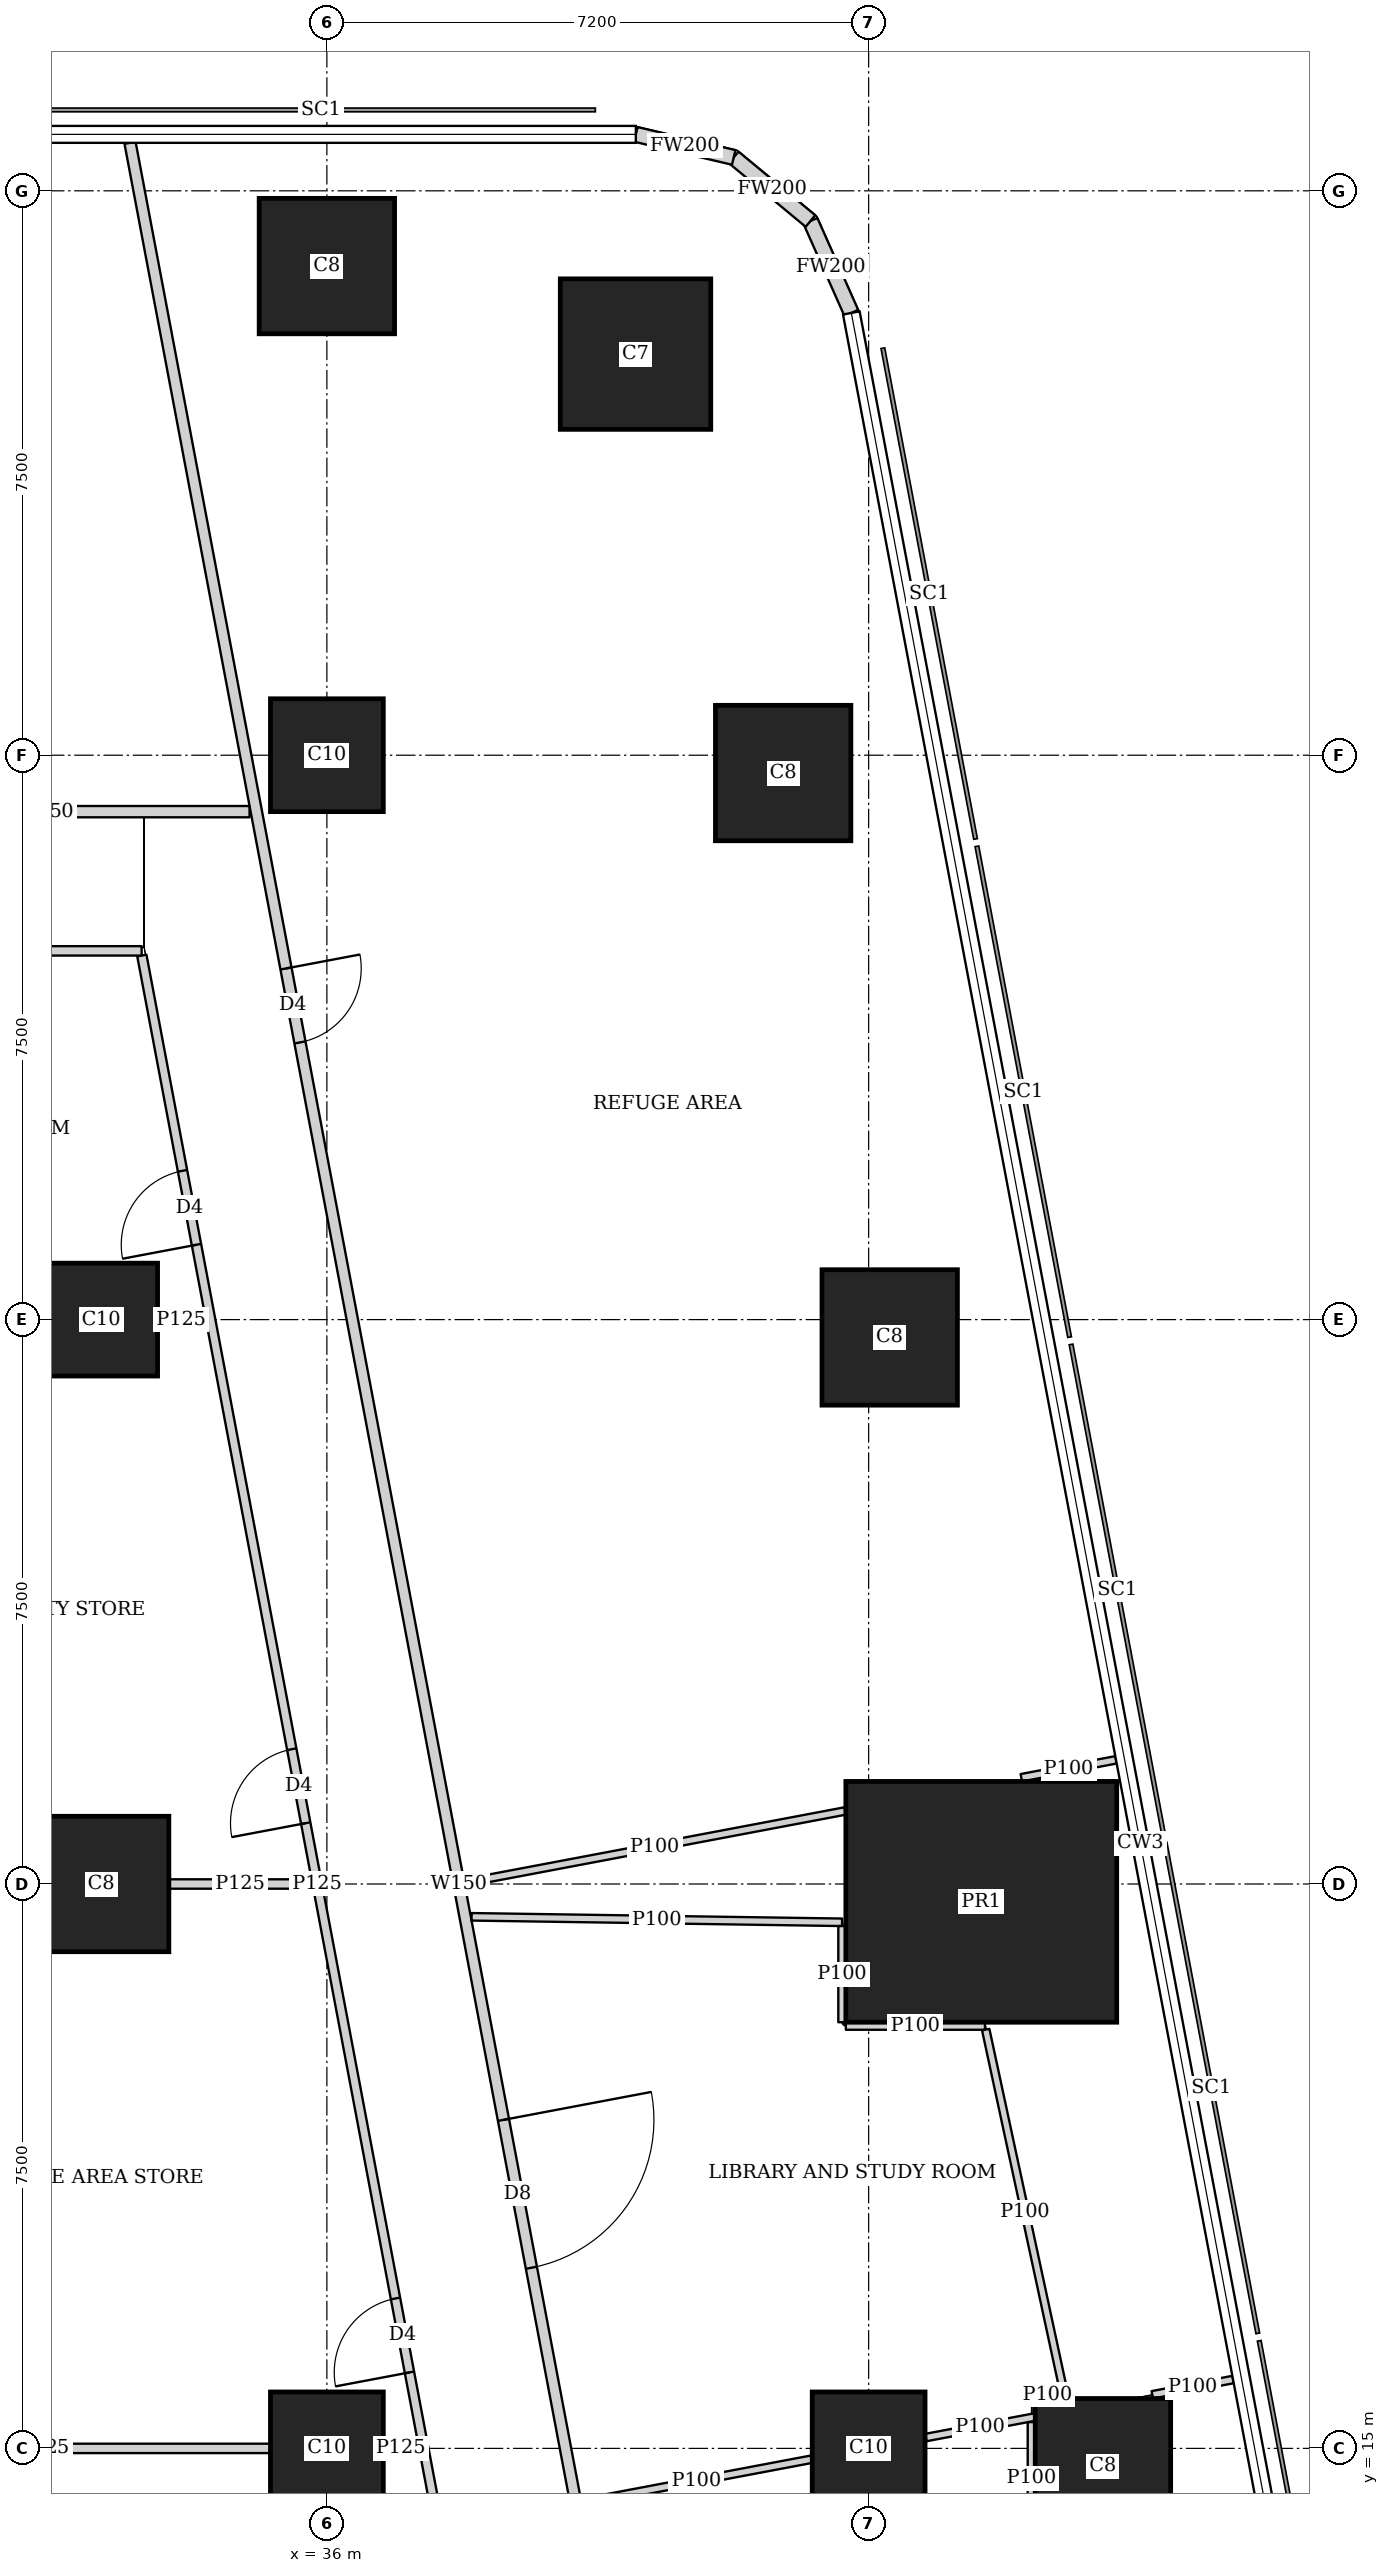
"""IFC4 building model, lengths in metres.
Left out: names, types, materials, properties, quantities, classifications, styles, units other than length and angle.
Written with IfcOpenShell. Run it as: python <this file> out.ifc"""

import sys

from ifc_helpers import new_model, si_unit, direction, frame, frame_2d, origin, origin_2d, place, context, subcontext, project, spatial, rectangle, extrude, element, fill, save


model = new_model("IFC4")
c1 = context("Model", 3, precision=1e-05, world=origin(), true_north=direction((0.0, 1.0)))
c2 = subcontext(c1, "Body", "Model", "MODEL_VIEW")
j1 = project(units=[si_unit("LENGTHUNIT", "METRE"), si_unit("PLANEANGLEUNIT", "RADIAN")], contexts=[c1])
p1 = place(None, origin())
s1 = spatial("IfcSite", under=j1, at=p1, CompositionType="ELEMENT")
p2 = place(p1, origin())
s2 = spatial("IfcBuilding", under=s1, at=p2, CompositionType="ELEMENT")
p3 = place(p2, frame((0.0, 0.0, 188.3)))
s3 = spatial("IfcBuildingStorey", under=s2, at=p3, CompositionType="ELEMENT", Elevation=188.3)
for number, where, z_axis, x_axis in (
    (1, (36.0, 15.0, 0.0), (0.0, 0.0, 1.0), (1.0, 0.0, 0.0)),
    (2, (43.2, 15.0, 0.0), (0.0, 0.0, 1.0), (1.0, 0.0, 0.0)),
):
    element("IfcColumn", number, at=place(p3, frame(where, z_axis=z_axis, x_axis=x_axis)), inside=s3, PredefinedType="COLUMN", context=c2, shape_type="SweptSolid", body=[
        extrude(rectangle(XDim=1.5, YDim=1.5, at=origin_2d()), origin(), (0.0, 0.0, 1.0), 5.4),
    ])
for number, where, z_axis, x_axis in (
    (3, (46.314, 14.763, 0.0), (0.0, 0.0, 1.0), (1.0, 0.0, 0.0)),
    (4, (33.0, 22.5, 0.0), (0.0, 0.0, 1.0), (1.0, 0.0, 0.0)),
):
    element("IfcColumn", number, at=place(p3, frame(where, z_axis=z_axis, x_axis=x_axis)), inside=s3, PredefinedType="COLUMN", context=c2, shape_type="SweptSolid", body=[
        extrude(rectangle(XDim=1.8, YDim=1.8, at=origin_2d()), origin(), (0.0, 0.0, 1.0), 5.4),
    ])
p4 = place(p3, frame((44.697, 22.263, 0.0), z_axis=(0.0, 0.0, 1.0), x_axis=(1.0, 0.0, 0.0)))
e5 = element("IfcColumn", 5, at=p4, inside=s3, PredefinedType="COLUMN", context=c2, shape_type="SweptSolid", body=[
    extrude(rectangle(XDim=3.6, YDim=3.2, at=origin_2d()), origin(), (0.0, 0.0, 1.0), 5.4),
])
p5 = place(p3, frame((33.0, 30.0, 0.0), z_axis=(0.0, 0.0, 1.0), x_axis=(1.0, 0.0, 0.0)))
e6 = element("IfcColumn", 6, at=p5, inside=s3, PredefinedType="COLUMN", context=c2, shape_type="SweptSolid", body=[
    extrude(rectangle(XDim=1.5, YDim=1.5, at=origin_2d()), origin(), (0.0, 0.0, 1.0), 5.4),
])
p6 = place(p3, frame((43.48, 29.763, 0.0), z_axis=(0.0, 0.0, 1.0), x_axis=(1.0, 0.0, 0.0)))
e7 = element("IfcColumn", 7, at=p6, inside=s3, PredefinedType="COLUMN", context=c2, shape_type="SweptSolid", body=[
    extrude(rectangle(XDim=1.8, YDim=1.8, at=origin_2d()), origin(), (0.0, 0.0, 1.0), 5.4),
])
p7 = place(p3, frame((36.0, 37.5, 0.0), z_axis=(0.0, 0.0, 1.0), x_axis=(1.0, 0.0, 0.0)))
e8 = element("IfcColumn", 8, at=p7, inside=s3, PredefinedType="COLUMN", context=c2, shape_type="SweptSolid", body=[
    extrude(rectangle(XDim=1.5, YDim=1.5, at=origin_2d()), origin(), (0.0, 0.0, 1.0), 5.4),
])
p8 = place(p3, frame((42.064, 37.263, 0.0), z_axis=(0.0, 0.0, 1.0), x_axis=(1.0, 0.0, 0.0)))
e9 = element("IfcColumn", 9, at=p8, inside=s3, PredefinedType="COLUMN", context=c2, shape_type="SweptSolid", body=[
    extrude(rectangle(XDim=1.8, YDim=1.8, at=origin_2d()), origin(), (0.0, 0.0, 1.0), 5.4),
])
p9 = place(p3, frame((40.102, 42.83, 0.0), z_axis=(0.0, 0.0, 1.0), x_axis=(1.0, 0.0, 0.0)))
e10 = element("IfcColumn", 10, at=p9, inside=s3, PredefinedType="COLUMN", context=c2, shape_type="SweptSolid", body=[
    extrude(rectangle(XDim=2.0, YDim=2.0, at=origin_2d()), origin(), (0.0, 0.0, 1.0), 5.4),
])
p10 = place(p3, frame((36.0, 44.0, 0.0), z_axis=(0.0, 0.0, 1.0), x_axis=(1.0, 0.0, 0.0)))
e11 = element("IfcColumn", 11, at=p10, inside=s3, PredefinedType="COLUMN", context=c2, shape_type="SweptSolid", body=[
    extrude(rectangle(XDim=1.8, YDim=1.8, at=origin_2d()), origin(), (0.0, 0.0, 1.0), 5.4),
])
p11 = place(p3, frame((42.97, 43.377, 0.0), z_axis=(0.0, 0.0, 1.0), x_axis=(-0.406002956633, 0.913871762998, 0.0)))
e12 = element("IfcWall", 12, at=p11, inside=s3, PredefinedType="SOLIDWALL", context=c2, shape_type="SweptSolid", body=[
    extrude(rectangle(XDim=1.337, YDim=0.2, at=frame_2d((0.669, 0.0))), origin(), (0.0, 0.0, 1.0), 5.15),
])
p12 = place(p3, frame((42.427, 44.599, 0.0), z_axis=(0.0, 0.0, 1.0), x_axis=(-0.770091412544, 0.637933551655, 0.0)))
e13 = element("IfcWall", 13, at=p12, inside=s3, PredefinedType="SOLIDWALL", context=c2, shape_type="SweptSolid", body=[
    extrude(rectangle(XDim=1.324, YDim=0.2, at=frame_2d((0.662, 0.0))), origin(), (0.0, 0.0, 1.0), 5.15),
])
p13 = place(p3, frame((41.407, 45.444, 0.0), z_axis=(0.0, 0.0, 1.0), x_axis=(-0.973453091607, 0.228886606077, 0.0)))
e14 = element("IfcWall", 14, at=p13, inside=s3, PredefinedType="SOLIDWALL", context=c2, shape_type="SweptSolid", body=[
    extrude(rectangle(XDim=1.336, YDim=0.2, at=frame_2d((0.668, 0.0))), origin(), (0.0, 0.0, 1.0), 5.15),
])
p14 = place(p3, frame((29.551, 36.75, 0.0), z_axis=(0.0, 0.0, 1.0), x_axis=(1.0, 0.0, 0.0)))
e15 = element("IfcWall", 15, at=p14, inside=s3, PredefinedType="SOLIDWALL", context=c2, shape_type="SweptSolid", body=[
    extrude(rectangle(XDim=5.421, YDim=0.15, at=frame_2d((2.71, 0.0))), origin(), (0.0, 0.0, 1.0), 3.15),
])
p15 = place(p3, frame((33.384, 45.638, 0.0), z_axis=(0.0, 0.0, 1.0), x_axis=(0.185609889355, -0.982623513342, 0.0)))
e16 = element("IfcWall", 16, at=p15, inside=s3, PredefinedType="SOLIDWALL", context=c2, shape_type="SweptSolid", body=[
    extrude(rectangle(XDim=47.093, YDim=0.15, at=frame_2d((23.547, 0.0))), origin(), (0.0, 0.0, 1.0), 3.35),
])
p16 = place(p15, frame((11.166, 0.0, 0.0)))
e17 = element("IfcOpeningElement", 17, at=p16, cuts=e16, PredefinedType="OPENING", context=c2, shape_type="SweptSolid", body=[
    extrude(rectangle(XDim=1.0, YDim=2.1, at=frame_2d((0.5, 1.05))), frame((0.0, 0.085, 0.0), z_axis=(0.0, -1.0, 0.0), x_axis=(1.0, 0.0, 0.0)), (0.0, 0.0, 1.0), 0.17),
])
p17 = place(p15, frame((26.737, 0.0, 0.0)))
e18 = element("IfcOpeningElement", 18, at=p17, cuts=e16, PredefinedType="OPENING", context=c2, shape_type="SweptSolid", body=[
    extrude(rectangle(XDim=2.0, YDim=2.1, at=frame_2d((1.0, 1.05))), frame((0.0, 0.085, 0.0), z_axis=(0.0, -1.0, 0.0), x_axis=(1.0, 0.0, 0.0)), (0.0, 0.0, 1.0), 0.17),
])
p18 = place(p15, frame((34.058, 0.0, 0.0)))
e19 = element("IfcOpeningElement", 19, at=p18, cuts=e16, PredefinedType="OPENING", context=c2, shape_type="SweptSolid", body=[
    extrude(rectangle(XDim=2.0, YDim=2.1, at=frame_2d((1.0, 1.05))), frame((0.0, 0.085, 0.0), z_axis=(0.0, -1.0, 0.0), x_axis=(1.0, 0.0, 0.0)), (0.0, 0.0, 1.0), 0.17),
])
p19 = place(p3, frame((46.487, 24.15, 0.0), z_axis=(0.0, 0.0, 1.0), x_axis=(-0.982601295661, -0.185727471759, 0.0)))
e20 = element("IfcWall", 20, at=p19, inside=s3, PredefinedType="PARTITIONING", context=c2, shape_type="SweptSolid", body=[
    extrude(rectangle(XDim=1.28, YDim=0.1, at=frame_2d((0.64, 0.0))), origin(), (0.0, 0.0, 1.0), 3.35),
])
p20 = place(p3, frame((42.887, 23.47, 0.0), z_axis=(0.0, 0.0, 1.0), x_axis=(-0.982608146753, -0.185691222019, 0.0)))
e21 = element("IfcWall", 21, at=p20, inside=s3, PredefinedType="PARTITIONING", context=c2, shape_type="SweptSolid", body=[
    extrude(rectangle(XDim=5.149, YDim=0.1, at=frame_2d((2.574, 0.0))), origin(), (0.0, 0.0, 1.0), 3.55),
])
p21 = place(p3, frame((48.043, 15.915, 0.0), z_axis=(0.0, 0.0, 1.0), x_axis=(-0.982549270777, -0.186002501317, 0.0)))
e22 = element("IfcWall", 22, at=p21, inside=s3, PredefinedType="PARTITIONING", context=c2, shape_type="SweptSolid", body=[
    extrude(rectangle(XDim=1.092, YDim=0.1, at=frame_2d((0.546, 0.0))), origin(), (0.0, 0.0, 1.0), 3.35),
])
p22 = place(p3, frame((45.404, 15.416, 0.0), z_axis=(0.0, 0.0, 1.0), x_axis=(-0.982723281097, -0.185080935781, 0.0)))
e23 = element("IfcWall", 23, at=p22, inside=s3, PredefinedType="PARTITIONING", context=c2, shape_type="SweptSolid", body=[
    extrude(rectangle(XDim=1.469, YDim=0.1, at=frame_2d((0.735, 0.0))), origin(), (0.0, 0.0, 1.0), 3.15),
])
p23 = place(p3, frame((42.44, 14.856, 0.0), z_axis=(0.0, 0.0, 1.0), x_axis=(-0.982643027883, -0.185506549084, 0.0)))
e24 = element("IfcWall", 24, at=p23, inside=s3, PredefinedType="PARTITIONING", context=c2, shape_type="SweptSolid", body=[
    extrude(rectangle(XDim=3.11, YDim=0.1, at=frame_2d((1.555, 0.0))), origin(), (0.0, 0.0, 1.0), 3.15),
])
p24 = place(p3, frame((28.95, 34.9, 0.0), z_axis=(0.0, 0.0, 1.0), x_axis=(1.0, 0.0, 0.0)))
e25 = element("IfcWall", 25, at=p24, inside=s3, PredefinedType="PARTITIONING", context=c2, shape_type="SweptSolid", body=[
    extrude(rectangle(XDim=4.588, YDim=0.125, at=frame_2d((2.294, 0.0))), origin(), (0.0, 0.0, 1.0), 3.15),
])
p25 = place(p3, frame((38.202, 10.163, 0.0), z_axis=(0.0, 0.0, 1.0), x_axis=(-0.185610321132, 0.982623431783, 0.0)))
e26 = element("IfcWall", 26, at=p25, inside=s3, PredefinedType="PARTITIONING", context=c2, shape_type="SweptSolid", body=[
    extrude(rectangle(XDim=25.111, YDim=0.125, at=frame_2d((12.556, 0.0))), origin(), (0.0, 0.0, 1.0), 3.55),
])
p26 = place(p25, frame((0.708, 0.0, 0.0)))
e27 = element("IfcOpeningElement", 27, at=p26, cuts=e26, PredefinedType="OPENING", context=c2, shape_type="SweptSolid", body=[
    extrude(rectangle(XDim=1.0, YDim=2.1, at=frame_2d((0.5, 1.05))), frame((0.0, 0.073, 0.0), z_axis=(0.0, -1.0, 0.0), x_axis=(1.0, 0.0, 0.0)), (0.0, 0.0, 1.0), 0.145),
])
p27 = place(p25, frame((5.95, 0.0, 0.0)))
e28 = element("IfcOpeningElement", 28, at=p27, cuts=e26, PredefinedType="OPENING", context=c2, shape_type="SweptSolid", body=[
    extrude(rectangle(XDim=1.0, YDim=2.1, at=frame_2d((0.5, 1.05))), frame((0.0, 0.073, 0.0), z_axis=(0.0, -1.0, 0.0), x_axis=(1.0, 0.0, 0.0)), (0.0, 0.0, 1.0), 0.145),
])
p28 = place(p25, frame((13.378, 0.0, 0.0)))
e29 = element("IfcOpeningElement", 29, at=p28, cuts=e26, PredefinedType="OPENING", context=c2, shape_type="SweptSolid", body=[
    extrude(rectangle(XDim=1.0, YDim=2.1, at=frame_2d((0.5, 1.05))), frame((0.0, 0.073, 0.0), z_axis=(0.0, -1.0, 0.0), x_axis=(1.0, 0.0, 0.0)), (0.0, 0.0, 1.0), 0.145),
])
p29 = place(p25, frame((21.2, 0.0, 0.0)))
e30 = element("IfcOpeningElement", 30, at=p29, cuts=e26, PredefinedType="OPENING", context=c2, shape_type="SweptSolid", body=[
    extrude(rectangle(XDim=1.0, YDim=2.1, at=frame_2d((0.5, 1.05))), frame((0.0, 0.073, 0.0), z_axis=(0.0, -1.0, 0.0), x_axis=(1.0, 0.0, 0.0)), (0.0, 0.0, 1.0), 0.145),
])
p30 = place(p3, frame((29.25, 15.0, 0.0), z_axis=(0.0, 0.0, 1.0), x_axis=(1.0, 0.0, 0.0)))
e31 = element("IfcWall", 31, at=p30, inside=s3, PredefinedType="PARTITIONING", context=c2, shape_type="SweptSolid", body=[
    extrude(rectangle(XDim=5.999, YDim=0.125, at=frame_2d((3.0, 0.0))), origin(), (0.0, 0.0, 1.0), 3.55),
])
p31 = place(p3, frame((36.751, 15.0, 0.0), z_axis=(0.0, 0.0, 1.0), x_axis=(1.0, 0.0, 0.0)))
e32 = element("IfcWall", 32, at=p31, inside=s3, PredefinedType="PARTITIONING", context=c2, shape_type="SweptSolid", body=[
    extrude(rectangle(XDim=0.462, YDim=0.125, at=frame_2d((0.231, 0.0))), origin(), (0.0, 0.0, 1.0), 3.55),
])
p32 = place(p3, frame((33.901, 22.5, 0.0), z_axis=(0.0, 0.0, 1.0), x_axis=(1.0, 0.0, 0.0)))
e33 = element("IfcWall", 33, at=p32, inside=s3, PredefinedType="PARTITIONING", context=c2, shape_type="SweptSolid", body=[
    extrude(rectangle(XDim=1.895, YDim=0.125, at=frame_2d((0.948, 0.0))), origin(), (0.0, 0.0, 1.0), 3.55),
])
p33 = place(p3, frame((33.751, 30.0, 0.0), z_axis=(0.0, 0.0, 1.0), x_axis=(1.0, 0.0, 0.0)))
e34 = element("IfcWall", 34, at=p33, inside=s3, PredefinedType="PARTITIONING", context=c2, shape_type="SweptSolid", body=[
    extrude(rectangle(XDim=0.628, YDim=0.125, at=frame_2d((0.314, 0.0))), origin(), (0.0, 0.0, 1.0), 3.55),
])
p34 = place(p3, frame((37.923, 22.064, 0.0), z_axis=(0.0, 0.0, 1.0), x_axis=(0.99989012089, -0.014823837076, 0.0)))
e35 = element("IfcWall", 35, at=p34, inside=s3, PredefinedType="PARTITIONING", context=c2, shape_type="SweptSolid", body=[
    extrude(rectangle(XDim=4.924, YDim=0.1, at=frame_2d((2.462, 0.0))), origin(), (0.0, 0.0, 1.0), 3.55),
])
p35 = place(p3, frame((42.847, 21.941, 0.0), z_axis=(0.0, 0.0, 1.0), x_axis=(0.0, -1.0, 0.0)))
e36 = element("IfcWall", 36, at=p35, inside=s3, PredefinedType="PARTITIONING", context=c2, shape_type="SweptSolid", body=[
    extrude(rectangle(XDim=1.278, YDim=0.1, at=frame_2d((0.639, 0.0))), origin(), (0.0, 0.0, 1.0), 3.55),
])
p36 = place(p3, frame((42.897, 20.613, 0.0), z_axis=(0.0, 0.0, 1.0), x_axis=(1.0, 0.0, 0.0)))
e37 = element("IfcWall", 37, at=p36, inside=s3, PredefinedType="PARTITIONING", context=c2, shape_type="SweptSolid", body=[
    extrude(rectangle(XDim=1.849, YDim=0.1, at=frame_2d((0.925, 0.0))), origin(), (0.0, 0.0, 1.0), 3.35),
])
p37 = place(p3, frame((44.756, 20.565, 0.0), z_axis=(0.0, 0.0, 1.0), x_axis=(0.210718064905, -0.9775468772, 0.0)))
e38 = element("IfcWall", 38, at=p37, inside=s3, PredefinedType="PARTITIONING", context=c2, shape_type="SweptSolid", body=[
    extrude(rectangle(XDim=4.963, YDim=0.1, at=frame_2d((2.482, 0.0))), origin(), (0.0, 0.0, 1.0), 3.15),
])
p38 = place(p3, frame((45.74, 15.713, 0.0), z_axis=(0.0, 0.0, 1.0), x_axis=(-1.0, 0.0, 0.0)))
e39 = element("IfcWall", 39, at=p38, inside=s3, PredefinedType="PARTITIONING", context=c2, shape_type="SweptSolid", body=[
    extrude(rectangle(XDim=0.326, YDim=0.1, at=frame_2d((0.163, 0.0))), origin(), (0.0, 0.0, 1.0), 3.15),
])
p39 = place(p3, frame((45.364, 15.349, 0.0), z_axis=(0.0, 0.0, 1.0), x_axis=(0.0, -1.0, 0.0)))
e40 = element("IfcWall", 40, at=p39, inside=s3, PredefinedType="PARTITIONING", context=c2, shape_type="SweptSolid", body=[
    extrude(rectangle(XDim=1.486, YDim=0.1, at=frame_2d((0.743, 0.0))), origin(), (0.0, 0.0, 1.0), 3.15),
])
p40 = place(p16, origin())
e41 = element("IfcDoor", 41, at=p40, inside=s3, OperationType="SINGLE_SWING_LEFT", PredefinedType="DOOR", context=c2, shape_type="SweptSolid", body=[
    extrude(rectangle(XDim=1.0, YDim=2.1, at=frame_2d((0.5, 1.05))), frame((0.0, 0.025, 0.0), z_axis=(0.0, -1.0, 0.0), x_axis=(1.0, 0.0, 0.0)), (0.0, 0.0, 1.0), 0.05),
])
fill(e17, e41)
p41 = place(p17, origin())
e42 = element("IfcDoor", 42, at=p41, inside=s3, OperationType="DOUBLE_DOOR_SINGLE_SWING", PredefinedType="DOOR", context=c2, shape_type="SweptSolid", body=[
    extrude(rectangle(XDim=2.0, YDim=2.1, at=frame_2d((1.0, 1.05))), frame((0.0, 0.025, 0.0), z_axis=(0.0, -1.0, 0.0), x_axis=(1.0, 0.0, 0.0)), (0.0, 0.0, 1.0), 0.05),
])
fill(e18, e42)
p42 = place(p27, origin())
e43 = element("IfcDoor", 43, at=p42, inside=s3, OperationType="SINGLE_SWING_LEFT", PredefinedType="DOOR", context=c2, shape_type="SweptSolid", body=[
    extrude(rectangle(XDim=1.0, YDim=2.1, at=frame_2d((0.5, 1.05))), frame((0.0, 0.025, 0.0), z_axis=(0.0, -1.0, 0.0), x_axis=(1.0, 0.0, 0.0)), (0.0, 0.0, 1.0), 0.05),
])
fill(e28, e43)
p43 = place(p28, origin())
e44 = element("IfcDoor", 44, at=p43, inside=s3, OperationType="SINGLE_SWING_LEFT", PredefinedType="DOOR", context=c2, shape_type="SweptSolid", body=[
    extrude(rectangle(XDim=1.0, YDim=2.1, at=frame_2d((0.5, 1.05))), frame((0.0, 0.025, 0.0), z_axis=(0.0, -1.0, 0.0), x_axis=(1.0, 0.0, 0.0)), (0.0, 0.0, 1.0), 0.05),
])
fill(e29, e44)
p44 = place(p29, origin())
e45 = element("IfcDoor", 45, at=p44, inside=s3, OperationType="SINGLE_SWING_LEFT", PredefinedType="DOOR", context=c2, shape_type="SweptSolid", body=[
    extrude(rectangle(XDim=1.0, YDim=2.1, at=frame_2d((0.5, 1.05))), frame((0.0, 0.025, 0.0), z_axis=(0.0, -1.0, 0.0), x_axis=(1.0, 0.0, 0.0)), (0.0, 0.0, 1.0), 0.05),
])
fill(e30, e45)
save(model, sys.argv[1])
